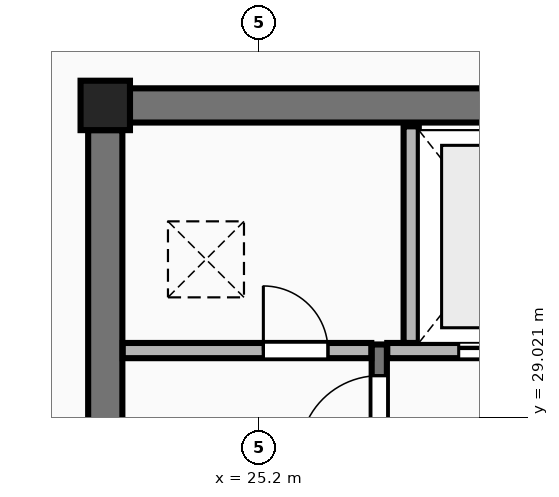
"""IFC4 building model, lengths in metres.
Left out: names, types, materials, properties, quantities, classifications, styles, units other than length and angle.
Written with IfcOpenShell. Run it as: python <this file> out.ifc"""

import sys

from ifc_helpers import new_model, si_unit, direction, frame, frame_2d, origin, origin_2d, place, context, subcontext, project, spatial, rectangle, extrude, element, fill, save


model = new_model("IFC4")
c1 = context("Model", 3, precision=1e-05, world=origin(), true_north=direction((0.0, 1.0)))
c2 = subcontext(c1, "Body", "Model", "MODEL_VIEW")
j1 = project(units=[si_unit("LENGTHUNIT", "METRE"), si_unit("PLANEANGLEUNIT", "RADIAN")], contexts=[c1])
p1 = place(None, origin())
s1 = spatial("IfcSite", under=j1, at=p1, CompositionType="ELEMENT")
p2 = place(p1, origin())
s2 = spatial("IfcBuilding", under=s1, at=p2, CompositionType="ELEMENT")
p3 = place(p2, frame((0.0, 0.0, 287.5)))
s3 = spatial("IfcBuildingStorey", under=s2, at=p3, CompositionType="ELEMENT", Elevation=287.5)
p4 = place(p3, frame((23.175, 33.125, 0.0), z_axis=(0.0, 0.0, 1.0), x_axis=(1.0, 0.0, 0.0)))
e1 = element("IfcColumn", 1, at=p4, inside=s3, PredefinedType="COLUMN", context=c2, shape_type="SweptSolid", body=[
    extrude(rectangle(XDim=0.65, YDim=0.65, at=origin_2d()), origin(), (0.0, 0.0, 1.0), 4.0),
])
p5 = place(p3, frame((23.5, 33.125, 0.0), z_axis=(0.0, 0.0, 1.0), x_axis=(1.0, 0.0, 0.0)))
e2 = element("IfcWall", 2, at=p5, inside=s3, PredefinedType="SHEAR", context=c2, shape_type="SweptSolid", body=[
    extrude(rectangle(XDim=17.8, YDim=0.45, at=frame_2d((8.9, 0.0))), origin(), (0.0, 0.0, 1.0), 3.8),
])
p6 = place(p3, frame((23.175, 19.0, 0.0), z_axis=(0.0, 0.0, 1.0), x_axis=(0.0, 1.0, 0.0)))
e3 = element("IfcWall", 3, at=p6, inside=s3, PredefinedType="SHEAR", context=c2, shape_type="SweptSolid", body=[
    extrude(rectangle(XDim=13.8, YDim=0.45, at=frame_2d((6.9, 0.0))), origin(), (0.0, 0.0, 1.0), 3.8),
])
p7 = place(p6, frame((2.84, 0.0, 0.0)))
e4 = element("IfcOpeningElement", 4, at=p7, cuts=e3, PredefinedType="OPENING", context=c2, shape_type="SweptSolid", body=[
    extrude(rectangle(XDim=1.22, YDim=2.25, at=frame_2d((0.61, 1.125))), frame((0.0, 0.235, 0.0), z_axis=(0.0, -1.0, 0.0), x_axis=(1.0, 0.0, 0.0)), (0.0, 0.0, 1.0), 0.47),
])
p8 = place(p3, frame((26.78, 23.2, 0.0), z_axis=(0.0, 0.0, 1.0), x_axis=(0.0, 1.0, 0.0)))
e5 = element("IfcWall", 5, at=p8, inside=s3, PredefinedType="SHEAR", context=c2, shape_type="SweptSolid", body=[
    extrude(rectangle(XDim=6.78, YDim=0.2, at=frame_2d((3.39, 0.0))), origin(), (0.0, 0.0, 1.0), 4.0),
])
p9 = place(p8, frame((5.32, 0.0, 0.0)))
e6 = element("IfcOpeningElement", 6, at=p9, cuts=e5, PredefinedType="OPENING", context=c2, shape_type="SweptSolid", body=[
    extrude(rectangle(XDim=1.05, YDim=2.15, at=frame_2d((0.525, 1.075))), frame((0.0, 0.11, 0.0), z_axis=(0.0, -1.0, 0.0), x_axis=(1.0, 0.0, 0.0)), (0.0, 0.0, 1.0), 0.22),
])
p10 = place(p3, frame((23.405, 29.9, 0.0), z_axis=(0.0, 0.0, 1.0), x_axis=(1.0, 0.0, 0.0)))
e7 = element("IfcWall", 7, at=p10, inside=s3, PredefinedType="PLUMBINGWALL", context=c2, shape_type="SweptSolid", body=[
    extrude(rectangle(XDim=3.27, YDim=0.2, at=frame_2d((1.635, 0.0))), origin(), (0.0, 0.0, 1.0), 3.8),
])
p11 = place(p10, frame((1.85, 0.0, 0.0)))
e8 = element("IfcOpeningElement", 8, at=p11, cuts=e7, PredefinedType="OPENING", context=c2, shape_type="SweptSolid", body=[
    extrude(rectangle(XDim=0.85, YDim=2.05, at=frame_2d((0.425, 1.025))), frame((0.0, 0.11, 0.0), z_axis=(0.0, -1.0, 0.0), x_axis=(1.0, 0.0, 0.0)), (0.0, 0.0, 1.0), 0.22),
])
p12 = place(p3, frame((26.885, 29.9, 0.0), z_axis=(0.0, 0.0, 1.0), x_axis=(1.0, 0.0, 0.0)))
e9 = element("IfcWall", 9, at=p12, inside=s3, PredefinedType="PLUMBINGWALL", context=c2, shape_type="SweptSolid", body=[
    extrude(rectangle(XDim=3.015, YDim=0.2, at=frame_2d((1.507, 0.0))), origin(), (0.0, 0.0, 1.0), 3.8),
])
p13 = place(p12, frame((0.94, 0.0, 0.0)))
e10 = element("IfcOpeningElement", 10, at=p13, cuts=e9, PredefinedType="OPENING", context=c2, shape_type="SweptSolid", body=[
    extrude(rectangle(XDim=1.15, YDim=2.2, at=frame_2d((0.575, 1.1))), frame((0.0, 0.11, 0.0), z_axis=(0.0, -1.0, 0.0), x_axis=(1.0, 0.0, 0.0)), (0.0, 0.0, 1.0), 0.22),
])
p14 = place(p3, frame((27.2, 30.0, 0.0), z_axis=(0.0, 0.0, 1.0), x_axis=(0.0, 1.0, 0.0)))
e11 = element("IfcWall", 11, at=p14, inside=s3, PredefinedType="PLUMBINGWALL", context=c2, shape_type="SweptSolid", body=[
    extrude(rectangle(XDim=2.85, YDim=0.2, at=frame_2d((1.425, 0.0))), origin(), (0.0, 0.0, 1.0), 3.8),
])
p15 = place(p9, origin())
e12 = element("IfcDoor", 12, at=p15, inside=s3, OperationType="SINGLE_SWING_LEFT", PredefinedType="DOOR", context=c2, shape_type="SweptSolid", body=[
    extrude(rectangle(XDim=1.05, YDim=2.15, at=frame_2d((0.525, 1.075))), frame((0.0, 0.025, 0.0), z_axis=(0.0, -1.0, 0.0), x_axis=(1.0, 0.0, 0.0)), (0.0, 0.0, 1.0), 0.05),
])
fill(e6, e12)
p16 = place(p11, origin())
e13 = element("IfcDoor", 13, at=p16, inside=s3, OperationType="SINGLE_SWING_LEFT", PredefinedType="DOOR", context=c2, shape_type="SweptSolid", body=[
    extrude(rectangle(XDim=0.85, YDim=2.05, at=frame_2d((0.425, 1.025))), frame((0.0, 0.025, 0.0), z_axis=(0.0, -1.0, 0.0), x_axis=(1.0, 0.0, 0.0)), (0.0, 0.0, 1.0), 0.05),
])
fill(e8, e13)
p17 = place(p13, origin())
e14 = element("IfcDoor", 14, at=p17, inside=s3, OperationType="DOUBLE_DOOR_SLIDING", PredefinedType="DOOR", context=c2, shape_type="SweptSolid", body=[
    extrude(rectangle(XDim=1.15, YDim=2.2, at=frame_2d((0.575, 1.1))), frame((0.0, 0.025, 0.0), z_axis=(0.0, -1.0, 0.0), x_axis=(1.0, 0.0, 0.0)), (0.0, 0.0, 1.0), 0.05),
])
fill(e10, e14)
save(model, sys.argv[1])
